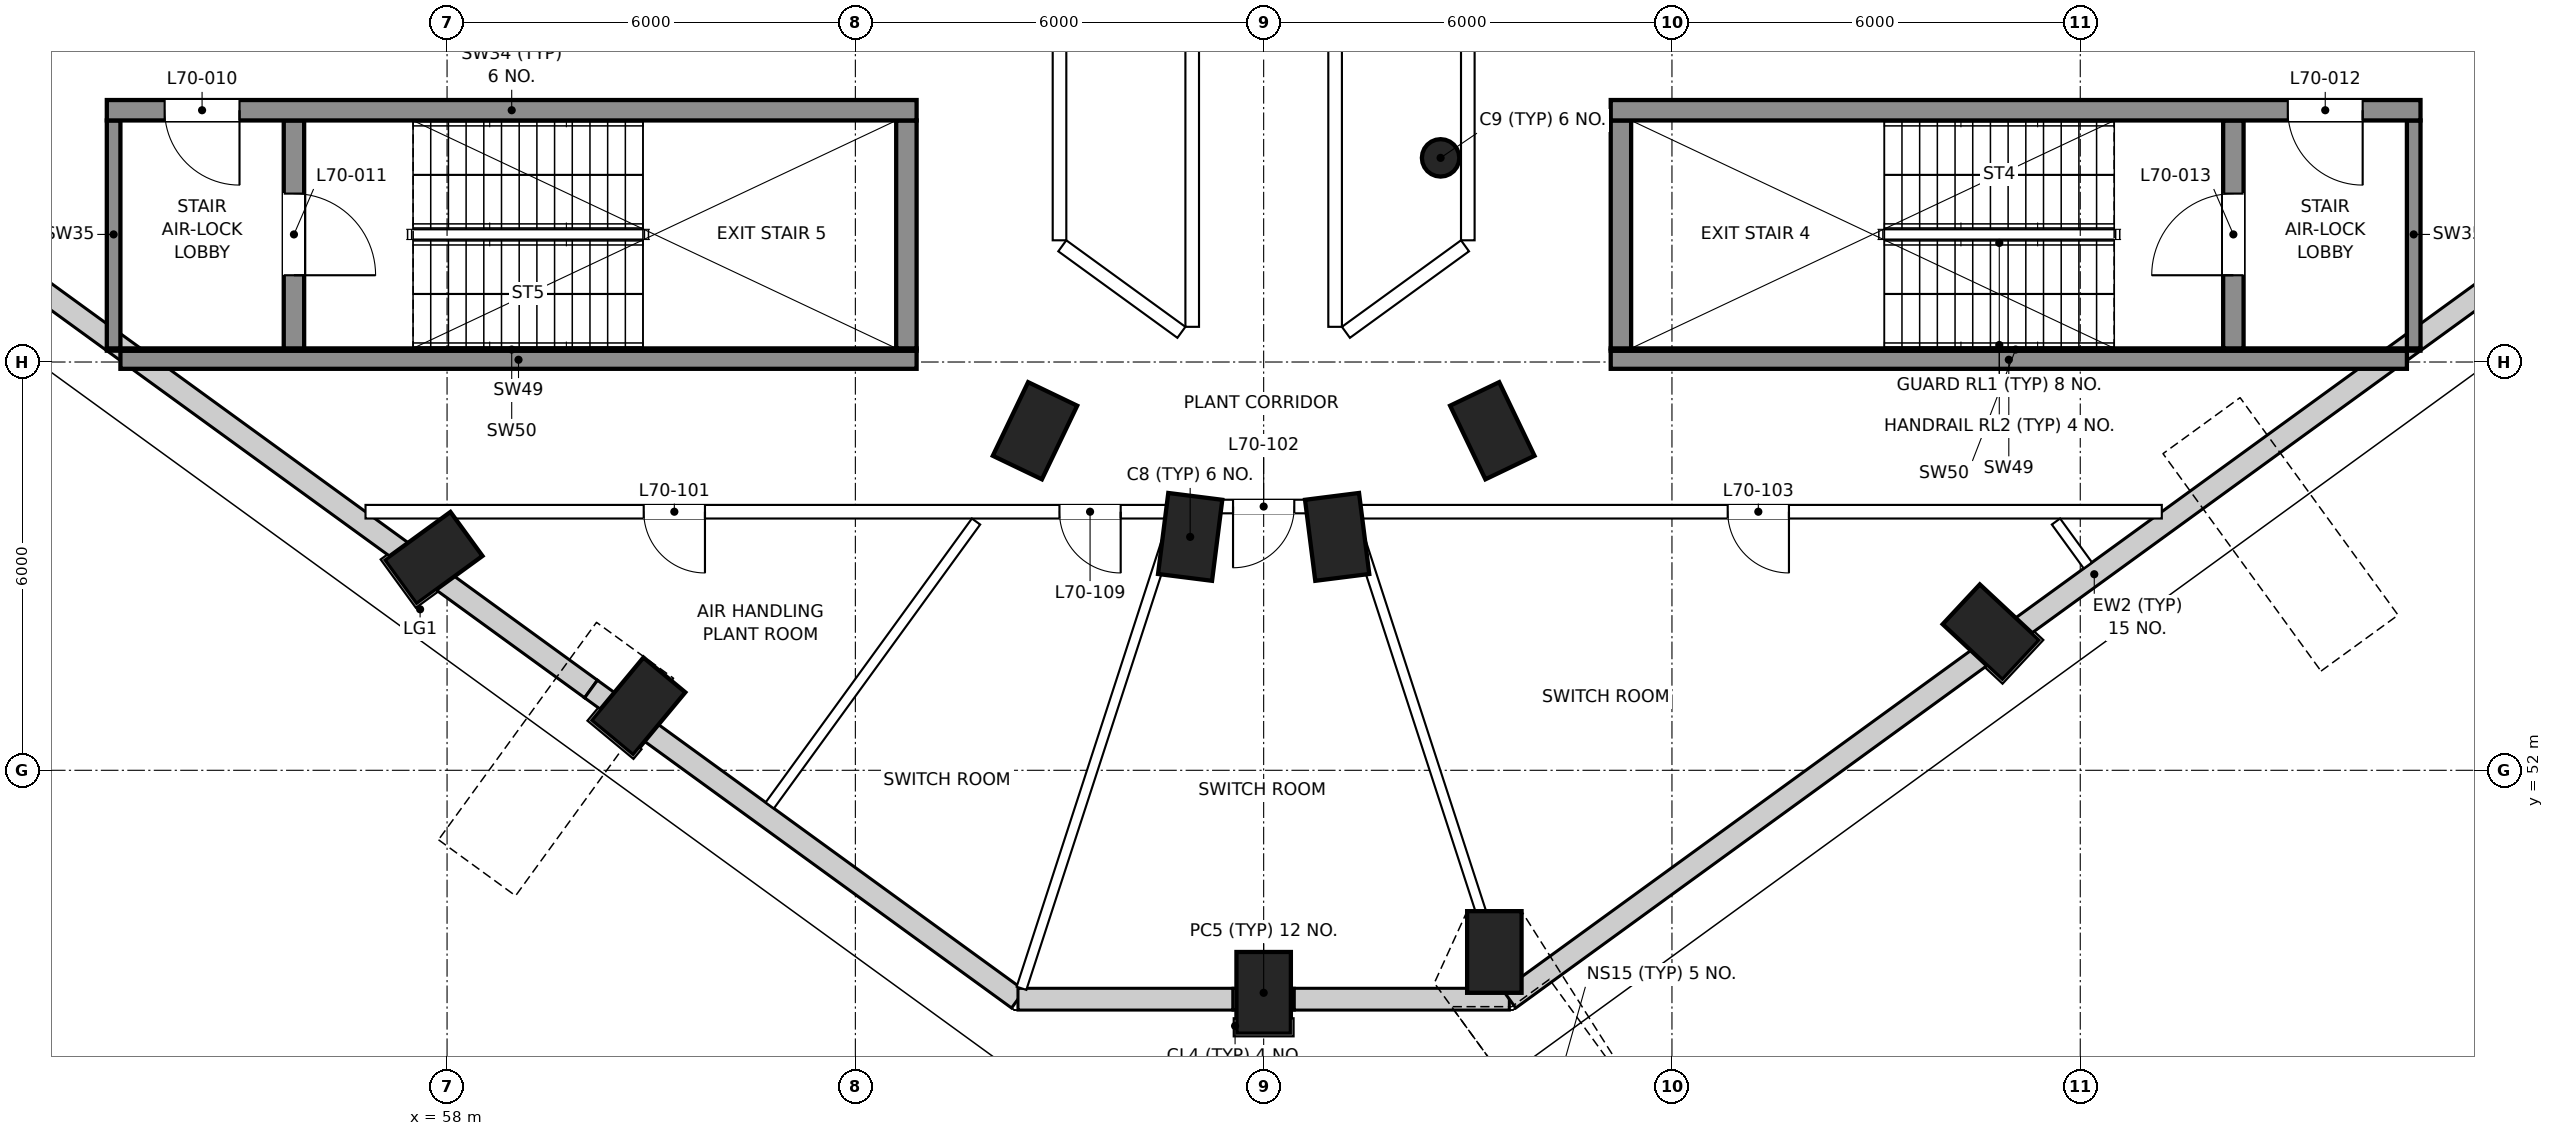
"""IFC4 building model, lengths in metres.
Left out: names, types, materials, properties, quantities, classifications, styles, units other than length and angle.
Written with IfcOpenShell. Run it as: python <this file> out.ifc"""

import sys

from ifc_helpers import new_model, si_unit, direction, frame, frame_2d, origin, origin_2d, place, context, subcontext, project, spatial, rectangle, circle, extrude, element, fill, save


model = new_model("IFC4")
c1 = context("Model", 3, precision=1e-05, world=origin(), true_north=direction((0.0, 1.0)))
c2 = subcontext(c1, "Body", "Model", "MODEL_VIEW")
j1 = project(units=[si_unit("LENGTHUNIT", "METRE"), si_unit("PLANEANGLEUNIT", "RADIAN")], contexts=[c1])
p1 = place(None, origin())
s1 = spatial("IfcSite", under=j1, at=p1, CompositionType="ELEMENT")
p2 = place(p1, origin())
s2 = spatial("IfcBuilding", under=s1, at=p2, CompositionType="ELEMENT")
p3 = place(p2, frame((0.0, 0.0, 295.1)))
s3 = spatial("IfcBuildingStorey", under=s2, at=p3, CompositionType="ELEMENT", Elevation=295.1)
for number, where, z_axis, x_axis in (
    (1, (57.8, 55.12, 0.0), (0.0, 0.0, 1.0), (-0.588, 0.809, 0.0)),
    (2, (60.81, 52.94, 0.0), (0.0, 0.0, 1.0), (-0.769, 0.639, 0.0)),
    (3, (70.0, 48.73, 0.0), (0.0, 0.0, 1.0), (-1.0, 0.0, 0.0)),
    (4, (73.39, 49.33, 0.0), (0.0, 0.0, 1.0), (-1.0, 0.0, 0.0)),
    (5, (80.69, 54.03, 0.0), (0.0, 0.0, 1.0), (-0.682, -0.731, 0.0)),
    (6, (66.64, 56.99, 0.0), (0.0, 0.0, 1.0), (-0.902, 0.432, 0.0)),
    (7, (68.92, 55.43, 0.0), (0.0, 0.0, 1.0), (-0.992, 0.126, 0.0)),
    (8, (71.08, 55.43, 0.0), (0.0, 0.0, 1.0), (-0.992, -0.126, 0.0)),
    (9, (73.36, 56.99, 0.0), (0.0, 0.0, 1.0), (-0.902, -0.432, 0.0)),
):
    element("IfcColumn", number, at=place(p3, frame(where, z_axis=z_axis, x_axis=x_axis)), inside=s3, PredefinedType="COLUMN", context=c2, shape_type="SweptSolid", body=[
        extrude(rectangle(XDim=0.8, YDim=1.2, at=origin_2d()), origin(), (0.0, 0.0, 1.0), 5.0),
    ])
p4 = place(p3, frame((72.6, 61.0, 0.0), z_axis=(0.0, 0.0, 1.0), x_axis=(1.0, 0.0, 0.0)))
e10 = element("IfcColumn", 10, at=p4, inside=s3, PredefinedType="COLUMN", context=c2, shape_type="SweptSolid", body=[
    extrude(circle(Radius=0.275, at=origin_2d()), origin(), (0.0, 0.0, 1.0), 5.0),
])
p5 = place(p3, frame((49.199, 61.126, 0.0), z_axis=(0.0, 0.0, 1.0), x_axis=(0.809017645501, -0.587784356093, 0.0)))
e11 = element("IfcWall", 11, at=p5, inside=s3, PredefinedType="SOLIDWALL", context=c2, shape_type="SweptSolid", body=[
    extrude(rectangle(XDim=13.494, YDim=0.32, at=frame_2d((6.747, 0.0))), origin(), (0.0, 0.0, 1.0), 4.6),
])
p6 = place(p3, frame((60.116, 53.195, 0.0), z_axis=(0.0, 0.0, 1.0), x_axis=(0.808860100839, -0.588001137134, 0.0)))
e12 = element("IfcWall", 12, at=p6, inside=s3, PredefinedType="SOLIDWALL", context=c2, shape_type="SweptSolid", body=[
    extrude(rectangle(XDim=0.681, YDim=0.32, at=frame_2d((0.34, 0.0))), origin(), (0.0, 0.0, 1.0), 3.57),
])
p7 = place(p3, frame((60.667, 52.794, 0.0), z_axis=(0.0, 0.0, 1.0), x_axis=(0.809015080735, -0.587787886182, 0.0)))
e13 = element("IfcWall", 13, at=p7, inside=s3, PredefinedType="SOLIDWALL", context=c2, shape_type="SweptSolid", body=[
    extrude(rectangle(XDim=7.074, YDim=0.32, at=frame_2d((3.537, 0.0))), origin(), (0.0, 0.0, 1.0), 4.6),
])
p8 = place(p3, frame((66.389, 48.636, 0.0), z_axis=(0.0, 0.0, 1.0), x_axis=(1.0, 0.0, 0.0)))
e14 = element("IfcWall", 14, at=p8, inside=s3, PredefinedType="SOLIDWALL", context=c2, shape_type="SweptSolid", body=[
    extrude(rectangle(XDim=3.161, YDim=0.32, at=frame_2d((1.58, 0.0))), origin(), (0.0, 0.0, 1.0), 4.6),
])
p9 = place(p3, frame((69.55, 48.636, 0.0), z_axis=(0.0, 0.0, 1.0), x_axis=(1.0, 0.0, 0.0)))
e15 = element("IfcWall", 15, at=p9, inside=s3, PredefinedType="SOLIDWALL", context=c2, shape_type="SweptSolid", body=[
    extrude(rectangle(XDim=0.9, YDim=0.32, at=frame_2d((0.45, 0.0))), origin(), (0.0, 0.0, 1.0), 3.57),
])
p10 = place(p3, frame((70.45, 48.636, 0.0), z_axis=(0.0, 0.0, 1.0), x_axis=(1.0, 0.0, 0.0)))
e16 = element("IfcWall", 16, at=p10, inside=s3, PredefinedType="SOLIDWALL", context=c2, shape_type="SweptSolid", body=[
    extrude(rectangle(XDim=3.161, YDim=0.32, at=frame_2d((1.58, 0.0))), origin(), (0.0, 0.0, 1.0), 4.6),
])
p11 = place(p3, frame((73.611, 48.636, 0.0), z_axis=(0.0, 0.0, 1.0), x_axis=(0.809011743964, 0.587792478796, 0.0)))
e17 = element("IfcWall", 17, at=p11, inside=s3, PredefinedType="SOLIDWALL", context=c2, shape_type="SweptSolid", body=[
    extrude(rectangle(XDim=21.249, YDim=0.32, at=frame_2d((10.625, 0.0))), origin(), (0.0, 0.0, 1.0), 4.6),
])
for number, where, z_axis, x_axis in (
    (18, (53.2, 58.033, 0.0), (0.0, 0.0, 1.0), (1.0, 0.0, 0.0)),
    (19, (75.1, 58.033, 0.0), (0.0, 0.0, 1.0), (1.0, 0.0, 0.0)),
):
    element("IfcWall", number, at=place(p3, frame(where, z_axis=z_axis, x_axis=x_axis)), inside=s3, PredefinedType="SHEAR", context=c2, shape_type="SweptSolid", body=[
        extrude(rectangle(XDim=11.7, YDim=0.267, at=frame_2d((5.85, 0.0))), origin(), (0.0, 0.0, 1.0), 5.0),
    ])
for number, where, z_axis, x_axis in (
    (20, (53.0, 58.183, 0.0), (0.0, 0.0, 1.0), (1.0, 0.0, 0.0)),
    (21, (75.1, 58.183, 0.0), (0.0, 0.0, 1.0), (1.0, 0.0, 0.0)),
):
    element("IfcWall", number, at=place(p3, frame(where, z_axis=z_axis, x_axis=x_axis)), inside=s3, PredefinedType="SHEAR", context=c2, shape_type="SweptSolid", body=[
        extrude(rectangle(XDim=11.9, YDim=0.033, at=frame_2d((5.95, 0.0))), origin(), (0.0, 0.0, 1.0), 5.0),
    ])
p12 = place(p3, frame((53.1, 58.2, 0.0), z_axis=(0.0, 0.0, 1.0), x_axis=(0.0, 1.0, 0.0)))
e22 = element("IfcWall", 22, at=p12, inside=s3, PredefinedType="SHEAR", context=c2, shape_type="SweptSolid", body=[
    extrude(rectangle(XDim=3.35, YDim=0.2, at=frame_2d((1.675, 0.0))), origin(), (0.0, 0.0, 1.0), 5.0),
])
p13 = place(p3, frame((55.75, 58.2, 0.0), z_axis=(0.0, 0.0, 1.0), x_axis=(0.0, 1.0, 0.0)))
e23 = element("IfcWall", 23, at=p13, inside=s3, PredefinedType="SHEAR", context=c2, shape_type="SweptSolid", body=[
    extrude(rectangle(XDim=3.35, YDim=0.3, at=frame_2d((1.675, 0.0))), origin(), (0.0, 0.0, 1.0), 5.0),
])
p14 = place(p13, frame((1.075, 0.0, 0.0)))
e24 = element("IfcOpeningElement", 24, at=p14, cuts=e23, PredefinedType="OPENING", context=c2, shape_type="SweptSolid", body=[
    extrude(rectangle(XDim=1.2, YDim=2.1, at=frame_2d((0.6, 1.05))), frame((0.0, 0.16, 0.0), z_axis=(0.0, -1.0, 0.0), x_axis=(1.0, 0.0, 0.0)), (0.0, 0.0, 1.0), 0.32),
])
for number, where, z_axis, x_axis in (
    (25, (64.75, 58.2, 0.0), (0.0, 0.0, 1.0), (0.0, 1.0, 0.0)),
    (26, (75.25, 58.2, 0.0), (0.0, 0.0, 1.0), (0.0, 1.0, 0.0)),
):
    element("IfcWall", number, at=place(p3, frame(where, z_axis=z_axis, x_axis=x_axis)), inside=s3, PredefinedType="SHEAR", context=c2, shape_type="SweptSolid", body=[
        extrude(rectangle(XDim=3.35, YDim=0.3, at=frame_2d((1.675, 0.0))), origin(), (0.0, 0.0, 1.0), 5.0),
    ])
p15 = place(p3, frame((84.25, 58.2, 0.0), z_axis=(0.0, 0.0, 1.0), x_axis=(0.0, 1.0, 0.0)))
e27 = element("IfcWall", 27, at=p15, inside=s3, PredefinedType="SHEAR", context=c2, shape_type="SweptSolid", body=[
    extrude(rectangle(XDim=3.35, YDim=0.3, at=frame_2d((1.675, 0.0))), origin(), (0.0, 0.0, 1.0), 5.0),
])
p16 = place(p15, frame((1.075, 0.0, 0.0)))
e28 = element("IfcOpeningElement", 28, at=p16, cuts=e27, PredefinedType="OPENING", context=c2, shape_type="SweptSolid", body=[
    extrude(rectangle(XDim=1.2, YDim=2.1, at=frame_2d((0.6, 1.05))), frame((0.0, 0.16, 0.0), z_axis=(0.0, -1.0, 0.0), x_axis=(1.0, 0.0, 0.0)), (0.0, 0.0, 1.0), 0.32),
])
p17 = place(p3, frame((86.9, 58.2, 0.0), z_axis=(0.0, 0.0, 1.0), x_axis=(0.0, 1.0, 0.0)))
e29 = element("IfcWall", 29, at=p17, inside=s3, PredefinedType="SHEAR", context=c2, shape_type="SweptSolid", body=[
    extrude(rectangle(XDim=3.35, YDim=0.2, at=frame_2d((1.675, 0.0))), origin(), (0.0, 0.0, 1.0), 5.0),
])
p18 = place(p3, frame((53.0, 61.7, 0.0), z_axis=(0.0, 0.0, 1.0), x_axis=(1.0, 0.0, 0.0)))
e30 = element("IfcWall", 30, at=p18, inside=s3, PredefinedType="SHEAR", context=c2, shape_type="SweptSolid", body=[
    extrude(rectangle(XDim=11.9, YDim=0.3, at=frame_2d((5.95, 0.0))), origin(), (0.0, 0.0, 1.0), 5.0),
])
p19 = place(p18, frame((0.85, 0.0, 0.0)))
e31 = element("IfcOpeningElement", 31, at=p19, cuts=e30, PredefinedType="OPENING", context=c2, shape_type="SweptSolid", body=[
    extrude(rectangle(XDim=1.1, YDim=2.1, at=frame_2d((0.55, 1.05))), frame((0.0, 0.16, 0.0), z_axis=(0.0, -1.0, 0.0), x_axis=(1.0, 0.0, 0.0)), (0.0, 0.0, 1.0), 0.32),
])
p20 = place(p3, frame((75.1, 61.7, 0.0), z_axis=(0.0, 0.0, 1.0), x_axis=(1.0, 0.0, 0.0)))
e32 = element("IfcWall", 32, at=p20, inside=s3, PredefinedType="SHEAR", context=c2, shape_type="SweptSolid", body=[
    extrude(rectangle(XDim=11.9, YDim=0.3, at=frame_2d((5.95, 0.0))), origin(), (0.0, 0.0, 1.0), 5.0),
])
p21 = place(p20, frame((9.95, 0.0, 0.0)))
e33 = element("IfcOpeningElement", 33, at=p21, cuts=e32, PredefinedType="OPENING", context=c2, shape_type="SweptSolid", body=[
    extrude(rectangle(XDim=1.1, YDim=2.1, at=frame_2d((0.55, 1.05))), frame((0.0, 0.16, 0.0), z_axis=(0.0, -1.0, 0.0), x_axis=(1.0, 0.0, 0.0)), (0.0, 0.0, 1.0), 0.32),
])
p22 = place(p3, frame((83.198, 55.8, 0.0), z_axis=(0.0, 0.0, 1.0), x_axis=(-1.0, 0.0, 0.0)))
e34 = element("IfcWall", 34, at=p22, inside=s3, PredefinedType="PARTITIONING", context=c2, shape_type="SweptSolid", body=[
    extrude(rectangle(XDim=12.034, YDim=0.2, at=frame_2d((6.017, 0.0))), origin(), (0.0, 0.0, 1.0), 3.6),
])
p23 = place(p22, frame((5.479, 0.0, 0.0)))
e35 = element("IfcOpeningElement", 35, at=p23, cuts=e34, PredefinedType="OPENING", context=c2, shape_type="SweptSolid", body=[
    extrude(rectangle(XDim=0.9, YDim=2.1, at=frame_2d((0.45, 1.05))), frame((0.0, 0.11, 0.0), z_axis=(0.0, -1.0, 0.0), x_axis=(1.0, 0.0, 0.0)), (0.0, 0.0, 1.0), 0.22),
])
p24 = place(p3, frame((71.226, 55.876, 0.0), z_axis=(0.0, 0.0, 1.0), x_axis=(-1.0, 0.0, 0.0)))
e36 = element("IfcWall", 36, at=p24, inside=s3, PredefinedType="PARTITIONING", context=c2, shape_type="SweptSolid", body=[
    extrude(rectangle(XDim=2.451, YDim=0.2, at=frame_2d((1.226, 0.0))), origin(), (0.0, 0.0, 1.0), 3.6),
])
p25 = place(p24, frame((0.776, 0.0, 0.0)))
e37 = element("IfcOpeningElement", 37, at=p25, cuts=e36, PredefinedType="OPENING", context=c2, shape_type="SweptSolid", body=[
    extrude(rectangle(XDim=0.9, YDim=2.1, at=frame_2d((0.45, 1.05))), frame((0.0, 0.11, 0.0), z_axis=(0.0, -1.0, 0.0), x_axis=(1.0, 0.0, 0.0)), (0.0, 0.0, 1.0), 0.22),
])
p26 = place(p3, frame((68.836, 55.8, 0.0), z_axis=(0.0, 0.0, 1.0), x_axis=(-1.0, 0.0, 0.0)))
e38 = element("IfcWall", 38, at=p26, inside=s3, PredefinedType="PARTITIONING", context=c2, shape_type="SweptSolid", body=[
    extrude(rectangle(XDim=12.034, YDim=0.2, at=frame_2d((6.017, 0.0))), origin(), (0.0, 0.0, 1.0), 3.6),
])
p27 = place(p26, frame((7.046, 0.0, 0.0)))
e39 = element("IfcOpeningElement", 39, at=p27, cuts=e38, PredefinedType="OPENING", context=c2, shape_type="SweptSolid", body=[
    extrude(rectangle(XDim=0.9, YDim=2.1, at=frame_2d((0.45, 1.05))), frame((0.0, 0.11, 0.0), z_axis=(0.0, -1.0, 0.0), x_axis=(1.0, 0.0, 0.0)), (0.0, 0.0, 1.0), 0.22),
])
p28 = place(p26, frame((0.937, 0.0, 0.0)))
e40 = element("IfcOpeningElement", 40, at=p28, cuts=e38, PredefinedType="OPENING", context=c2, shape_type="SweptSolid", body=[
    extrude(rectangle(XDim=0.9, YDim=2.1, at=frame_2d((0.45, 1.05))), frame((0.0, 0.11, 0.0), z_axis=(0.0, -1.0, 0.0), x_axis=(1.0, 0.0, 0.0)), (0.0, 0.0, 1.0), 0.22),
])
p29 = place(p3, frame((71.05, 63.85, 0.0), z_axis=(0.0, 0.0, 1.0), x_axis=(0.0, -1.0, 0.0)))
e41 = element("IfcWall", 41, at=p29, inside=s3, PredefinedType="PARTITIONING", context=c2, shape_type="SweptSolid", body=[
    extrude(rectangle(XDim=5.333, YDim=0.2, at=frame_2d((2.667, 0.0))), origin(), (0.0, 0.0, 1.0), 3.6),
])
p30 = place(p3, frame((71.209, 58.436, 0.0), z_axis=(0.0, 0.0, 1.0), x_axis=(0.809009310944, 0.587795827483, 0.0)))
e42 = element("IfcWall", 42, at=p30, inside=s3, PredefinedType="PARTITIONING", context=c2, shape_type="SweptSolid", body=[
    extrude(rectangle(XDim=2.163, YDim=0.2, at=frame_2d((1.082, 0.0))), origin(), (0.0, 0.0, 1.0), 3.6),
])
p31 = place(p3, frame((73.0, 59.789, 0.0), z_axis=(0.0, 0.0, 1.0), x_axis=(0.0, 1.0, 0.0)))
e43 = element("IfcWall", 43, at=p31, inside=s3, PredefinedType="PARTITIONING", context=c2, shape_type="SweptSolid", body=[
    extrude(rectangle(XDim=4.062, YDim=0.2, at=frame_2d((2.031, 0.0))), origin(), (0.0, 0.0, 1.0), 3.6),
])
p32 = place(p3, frame((67.041, 59.708, 0.0), z_axis=(0.0, 0.0, 1.0), x_axis=(0.809009310944, -0.587795827483, 0.0)))
e44 = element("IfcWall", 44, at=p32, inside=s3, PredefinedType="PARTITIONING", context=c2, shape_type="SweptSolid", body=[
    extrude(rectangle(XDim=2.163, YDim=0.2, at=frame_2d((1.082, 0.0))), origin(), (0.0, 0.0, 1.0), 3.6),
])
p33 = place(p3, frame((68.95, 58.517, 0.0), z_axis=(0.0, 0.0, 1.0), x_axis=(0.0, 1.0, 0.0)))
e45 = element("IfcWall", 45, at=p33, inside=s3, PredefinedType="PARTITIONING", context=c2, shape_type="SweptSolid", body=[
    extrude(rectangle(XDim=5.333, YDim=0.2, at=frame_2d((2.667, 0.0))), origin(), (0.0, 0.0, 1.0), 3.6),
])
p34 = place(p3, frame((67.0, 63.85, 0.0), z_axis=(0.0, 0.0, 1.0), x_axis=(0.0, -1.0, 0.0)))
e46 = element("IfcWall", 46, at=p34, inside=s3, PredefinedType="PARTITIONING", context=c2, shape_type="SweptSolid", body=[
    extrude(rectangle(XDim=4.062, YDim=0.2, at=frame_2d((2.031, 0.0))), origin(), (0.0, 0.0, 1.0), 4.6),
])
for number, where, z_axis, x_axis in (
    (47, (66.441, 48.796, 0.0), (0.0, 0.0, 1.0), (0.309, 0.951, 0.0)),
    (48, (73.559, 48.796, 0.0), (0.0, 0.0, 1.0), (-0.309, 0.951, 0.0)),
):
    element("IfcWall", number, at=place(p3, frame(where, z_axis=z_axis, x_axis=x_axis)), inside=s3, PredefinedType="PARTITIONING", context=c2, shape_type="SweptSolid", body=[
        extrude(rectangle(XDim=7.234, YDim=0.15, at=frame_2d((3.617, 0.0))), origin(), (0.0, 0.0, 1.0), 3.6),
    ])
p35 = place(p3, frame((62.742, 51.484, 0.0), z_axis=(0.0, 0.0, 1.0), x_axis=(0.587757821162, 0.809036923547, 0.0)))
e49 = element("IfcWall", 49, at=p35, inside=s3, PredefinedType="PARTITIONING", context=c2, shape_type="SweptSolid", body=[
    extrude(rectangle(XDim=5.157, YDim=0.15, at=frame_2d((2.579, 0.0))), origin(), (0.0, 0.0, 1.0), 3.9),
])
p36 = place(p3, frame((66.68, 56.904, 0.0), z_axis=(0.0, 0.0, 1.0), x_axis=(0.587828604698, 0.808985495234, 0.0)))
e50 = element("IfcWall", 50, at=p36, inside=s3, PredefinedType="PARTITIONING", context=c2, shape_type="SweptSolid", body=[
    extrude(rectangle(XDim=0.381, YDim=0.15, at=frame_2d((0.19, 0.0))), origin(), (0.0, 0.0, 1.0), 3.6),
])
p37 = place(p3, frame((82.112, 55.011, 0.0), z_axis=(0.0, 0.0, 1.0), x_axis=(-0.58773478197, 0.809053660805, 0.0)))
e51 = element("IfcWall", 51, at=p37, inside=s3, PredefinedType="PARTITIONING", context=c2, shape_type="SweptSolid", body=[
    extrude(rectangle(XDim=0.798, YDim=0.15, at=frame_2d((0.399, 0.0))), origin(), (0.0, 0.0, 1.0), 4.6),
])
p38 = place(p19, frame((1.1, 0.0, 0.0), z_axis=(0.0, 0.0, 1.0), x_axis=(-1.0, 0.0, 0.0)))
e52 = element("IfcDoor", 52, at=p38, inside=s3, OperationType="SINGLE_SWING_LEFT", PredefinedType="DOOR", context=c2, shape_type="SweptSolid", body=[
    extrude(rectangle(XDim=1.1, YDim=2.1, at=frame_2d((0.55, 1.05))), frame((0.0, 0.025, 0.0), z_axis=(0.0, -1.0, 0.0), x_axis=(1.0, 0.0, 0.0)), (0.0, 0.0, 1.0), 0.05),
])
fill(e31, e52)
p39 = place(p14, frame((1.2, 0.0, 0.0), z_axis=(0.0, 0.0, 1.0), x_axis=(-1.0, 0.0, 0.0)))
e53 = element("IfcDoor", 53, at=p39, inside=s3, OperationType="SINGLE_SWING_RIGHT", PredefinedType="DOOR", context=c2, shape_type="SweptSolid", body=[
    extrude(rectangle(XDim=1.2, YDim=2.1, at=frame_2d((0.6, 1.05))), frame((0.0, 0.025, 0.0), z_axis=(0.0, -1.0, 0.0), x_axis=(1.0, 0.0, 0.0)), (0.0, 0.0, 1.0), 0.05),
])
fill(e24, e53)
p40 = place(p21, frame((1.1, 0.0, 0.0), z_axis=(0.0, 0.0, 1.0), x_axis=(-1.0, 0.0, 0.0)))
e54 = element("IfcDoor", 54, at=p40, inside=s3, OperationType="SINGLE_SWING_LEFT", PredefinedType="DOOR", context=c2, shape_type="SweptSolid", body=[
    extrude(rectangle(XDim=1.1, YDim=2.1, at=frame_2d((0.55, 1.05))), frame((0.0, 0.025, 0.0), z_axis=(0.0, -1.0, 0.0), x_axis=(1.0, 0.0, 0.0)), (0.0, 0.0, 1.0), 0.05),
])
fill(e33, e54)
p41 = place(p16, origin())
e55 = element("IfcDoor", 55, at=p41, inside=s3, OperationType="SINGLE_SWING_LEFT", PredefinedType="DOOR", context=c2, shape_type="SweptSolid", body=[
    extrude(rectangle(XDim=1.2, YDim=2.1, at=frame_2d((0.6, 1.05))), frame((0.0, 0.025, 0.0), z_axis=(0.0, -1.0, 0.0), x_axis=(1.0, 0.0, 0.0)), (0.0, 0.0, 1.0), 0.05),
])
fill(e28, e55)
p42 = place(p27, origin())
e56 = element("IfcDoor", 56, at=p42, inside=s3, OperationType="SINGLE_SWING_LEFT", PredefinedType="DOOR", context=c2, shape_type="SweptSolid", body=[
    extrude(rectangle(XDim=0.9, YDim=2.1, at=frame_2d((0.45, 1.05))), frame((0.0, 0.025, 0.0), z_axis=(0.0, -1.0, 0.0), x_axis=(1.0, 0.0, 0.0)), (0.0, 0.0, 1.0), 0.05),
])
fill(e39, e56)
p43 = place(p25, origin())
e57 = element("IfcDoor", 57, at=p43, inside=s3, OperationType="SINGLE_SWING_RIGHT", PredefinedType="DOOR", context=c2, shape_type="SweptSolid", body=[
    extrude(rectangle(XDim=0.9, YDim=2.1, at=frame_2d((0.45, 1.05))), frame((0.0, 0.025, 0.0), z_axis=(0.0, -1.0, 0.0), x_axis=(1.0, 0.0, 0.0)), (0.0, 0.0, 1.0), 0.05),
])
fill(e37, e57)
p44 = place(p23, origin())
e58 = element("IfcDoor", 58, at=p44, inside=s3, OperationType="SINGLE_SWING_LEFT", PredefinedType="DOOR", context=c2, shape_type="SweptSolid", body=[
    extrude(rectangle(XDim=0.9, YDim=2.1, at=frame_2d((0.45, 1.05))), frame((0.0, 0.025, 0.0), z_axis=(0.0, -1.0, 0.0), x_axis=(1.0, 0.0, 0.0)), (0.0, 0.0, 1.0), 0.05),
])
fill(e35, e58)
p45 = place(p28, origin())
e59 = element("IfcDoor", 59, at=p45, inside=s3, OperationType="SINGLE_SWING_LEFT", PredefinedType="DOOR", context=c2, shape_type="SweptSolid", body=[
    extrude(rectangle(XDim=0.9, YDim=2.1, at=frame_2d((0.45, 1.05))), frame((0.0, 0.025, 0.0), z_axis=(0.0, -1.0, 0.0), x_axis=(1.0, 0.0, 0.0)), (0.0, 0.0, 1.0), 0.05),
])
fill(e40, e59)
save(model, sys.argv[1])
